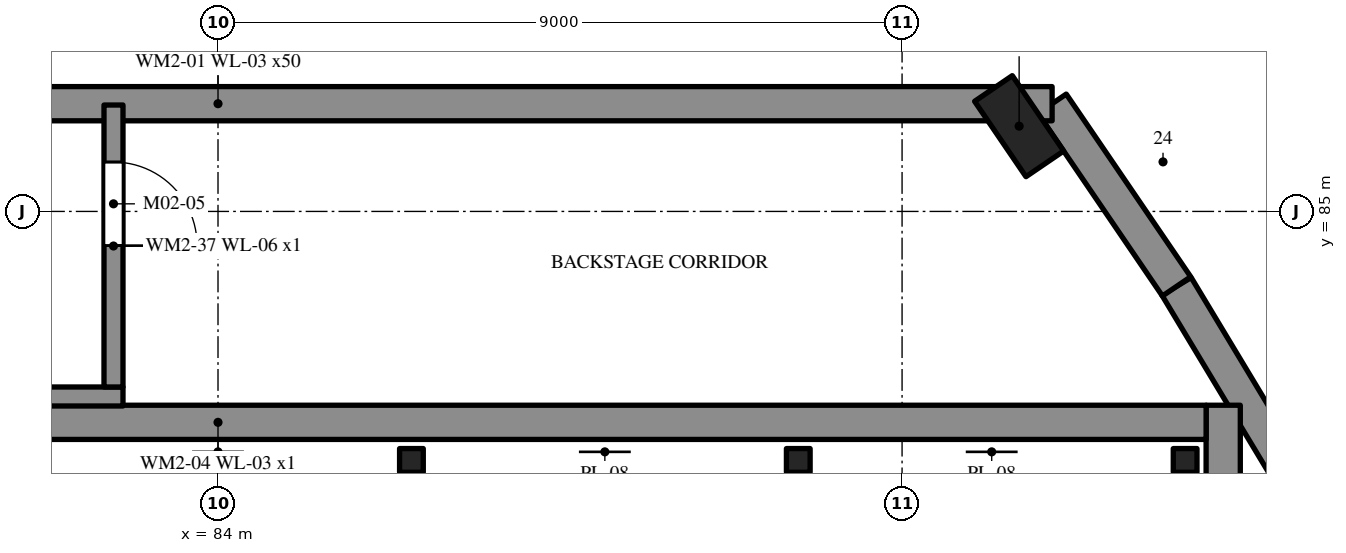
"""IFC4 building model, lengths in metres.
Left out: names, types, materials, properties, quantities, classifications, styles, units other than length and angle.
Written with IfcOpenShell. Run it as: python <this file> out.ifc"""

import sys

from ifc_helpers import new_model, si_unit, direction, frame, frame_2d, origin, origin_2d, place, context, subcontext, project, spatial, rectangle, i_section, extrude, element, fill, save


model = new_model("IFC4")
c1 = context("Model", 3, precision=1e-05, world=origin(), true_north=direction((0.0, 1.0)))
c2 = subcontext(c1, "Body", "Model", "MODEL_VIEW")
j1 = project(units=[si_unit("LENGTHUNIT", "METRE"), si_unit("PLANEANGLEUNIT", "RADIAN")], contexts=[c1])
p1 = place(None, origin())
s1 = spatial("IfcSite", under=j1, at=p1, CompositionType="ELEMENT")
p2 = place(p1, origin())
s2 = spatial("IfcBuilding", under=s1, at=p2, CompositionType="ELEMENT")
p3 = place(p2, frame((0.0, 0.0, 10.2)))
s3 = spatial("IfcBuildingStorey", under=s2, at=p3, CompositionType="ELEMENT", Elevation=10.2)
p4 = place(p3, frame((98.169, 81.425, 0.0), z_axis=(0.0, 0.0, 1.0), x_axis=(-0.515636119523, 0.856807675177, 0.0)))
e1 = element("IfcWall", 1, at=p4, inside=s3, PredefinedType="SOLIDWALL", context=c2, shape_type="SweptSolid", body=[
    extrude(rectangle(XDim=3.021, YDim=0.45, at=frame_2d((1.511, 0.0))), origin(), (0.0, 0.0, 1.0), 4.6),
])
p5 = place(p3, frame((96.611, 84.014, 0.0), z_axis=(0.0, 0.0, 1.0), x_axis=(-0.5629642644, 0.826481238147, 0.0)))
e2 = element("IfcWall", 2, at=p5, inside=s3, PredefinedType="SOLIDWALL", context=c2, shape_type="SweptSolid", body=[
    extrude(rectangle(XDim=2.908, YDim=0.45, at=frame_2d((1.454, 0.0))), origin(), (0.0, 0.0, 1.0), 4.6),
])
p6 = place(p3, frame((94.974, 86.417, 0.0), z_axis=(0.0, 0.0, 1.0), x_axis=(-1.0, 0.0, 0.0)))
e3 = element("IfcWall", 3, at=p6, inside=s3, PredefinedType="SOLIDWALL", context=c2, shape_type="SweptSolid", body=[
    extrude(rectangle(XDim=21.948, YDim=0.45, at=frame_2d((10.974, 0.0))), origin(), (0.0, 0.0, 1.0), 4.6),
])
p7 = place(p3, frame((97.225, 55.4, 0.0), z_axis=(0.0, 0.0, 1.0), x_axis=(0.0, 1.0, 0.0)))
e4 = element("IfcWall", 4, at=p7, inside=s3, PredefinedType="SOLIDWALL", context=c2, shape_type="SweptSolid", body=[
    extrude(rectangle(XDim=27.05, YDim=0.45, at=frame_2d((13.525, 0.0))), origin(), (0.0, 0.0, 1.0), 4.6),
])
p8 = place(p7, frame((21.95, 0.0, 0.0)))
e5 = element("IfcOpeningElement", 5, at=p8, cuts=e4, PredefinedType="OPENING", context=c2, shape_type="SweptSolid", body=[
    extrude(rectangle(XDim=1.3, YDim=2.1, at=frame_2d((0.65, 1.05))), frame((0.0, 0.235, 0.0), z_axis=(0.0, -1.0, 0.0), x_axis=(1.0, 0.0, 0.0)), (0.0, 0.0, 1.0), 0.47),
])
p9 = place(p3, frame((71.0, 82.225, 0.0), z_axis=(0.0, 0.0, 1.0), x_axis=(1.0, 0.0, 0.0)))
e6 = element("IfcWall", 6, at=p9, inside=s3, PredefinedType="SOLIDWALL", context=c2, shape_type="SweptSolid", body=[
    extrude(rectangle(XDim=26.0, YDim=0.45, at=frame_2d((13.0, 0.0))), origin(), (0.0, 0.0, 1.0), 4.6),
])
p10 = place(p3, frame((94.54, 86.122, 0.0), z_axis=(0.0, 0.0, 1.0), x_axis=(-0.562978035902, 0.82647185741, 0.0)))
e7 = element("IfcColumn", 7, at=p10, inside=s3, PredefinedType="PILASTER", context=c2, shape_type="SweptSolid", body=[
    extrude(rectangle(XDim=1.2, YDim=0.6, at=origin_2d()), origin(), (0.0, 0.0, 1.0), 4.6),
])
p11 = place(p3, frame((74.55, 82.565, 0.0), z_axis=(0.0, 0.0, 1.0), x_axis=(1.0, 0.0, 0.0)))
e8 = element("IfcWall", 8, at=p11, inside=s3, PredefinedType="SHEAR", context=c2, shape_type="SweptSolid", body=[
    extrude(rectangle(XDim=8.2, YDim=0.25, at=frame_2d((4.1, 0.0))), origin(), (0.0, 0.0, 1.0), 4.6),
])
p12 = place(p3, frame((82.625, 86.4, 0.0), z_axis=(0.0, 0.0, 1.0), x_axis=(0.0, -1.0, 0.0)))
e9 = element("IfcWall", 9, at=p12, inside=s3, PredefinedType="SHEAR", context=c2, shape_type="SweptSolid", body=[
    extrude(rectangle(XDim=3.71, YDim=0.25, at=frame_2d((1.855, 0.0))), origin(), (0.0, 0.0, 1.0), 4.6),
])
p13 = place(p12, frame((0.75, 0.0, 0.0)))
e10 = element("IfcOpeningElement", 10, at=p13, cuts=e9, PredefinedType="OPENING", context=c2, shape_type="SweptSolid", body=[
    extrude(rectangle(XDim=1.1, YDim=2.1, at=frame_2d((0.55, 1.05))), frame((0.0, 0.135, 0.0), z_axis=(0.0, -1.0, 0.0), x_axis=(1.0, 0.0, 0.0)), (0.0, 0.0, 1.0), 0.27),
])
for number, where, z_axis, x_axis in (
    (11, (86.545, 81.724, 0.0), (0.0, 0.0, 1.0), (1.0, 0.0, 0.0)),
    (12, (91.635, 81.724, 0.0), (0.0, 0.0, 1.0), (1.0, 0.0, 0.0)),
    (13, (96.724, 81.724, 0.0), (0.0, 0.0, 1.0), (1.0, 0.0, 0.0)),
):
    element("IfcColumn", number, at=place(p3, frame(where, z_axis=z_axis, x_axis=x_axis)), inside=s3, PredefinedType="COLUMN", context=c2, shape_type="SweptSolid", body=[
        extrude(i_section(OverallWidth=0.312, OverallDepth=0.312, WebThickness=0.017, FlangeThickness=0.017, FilletRadius=0.016, at=origin_2d()), origin(), (0.0, 0.0, 1.0), 4.6),
    ])
p14 = place(p13, origin())
e14 = element("IfcDoor", 14, at=p14, inside=s3, OperationType="SINGLE_SWING_RIGHT", PredefinedType="DOOR", context=c2, shape_type="SweptSolid", body=[
    extrude(rectangle(XDim=1.1, YDim=2.1, at=frame_2d((0.55, 1.05))), frame((0.0, 0.025, 0.0), z_axis=(0.0, -1.0, 0.0), x_axis=(1.0, 0.0, 0.0)), (0.0, 0.0, 1.0), 0.05),
])
fill(e10, e14)
save(model, sys.argv[1])
